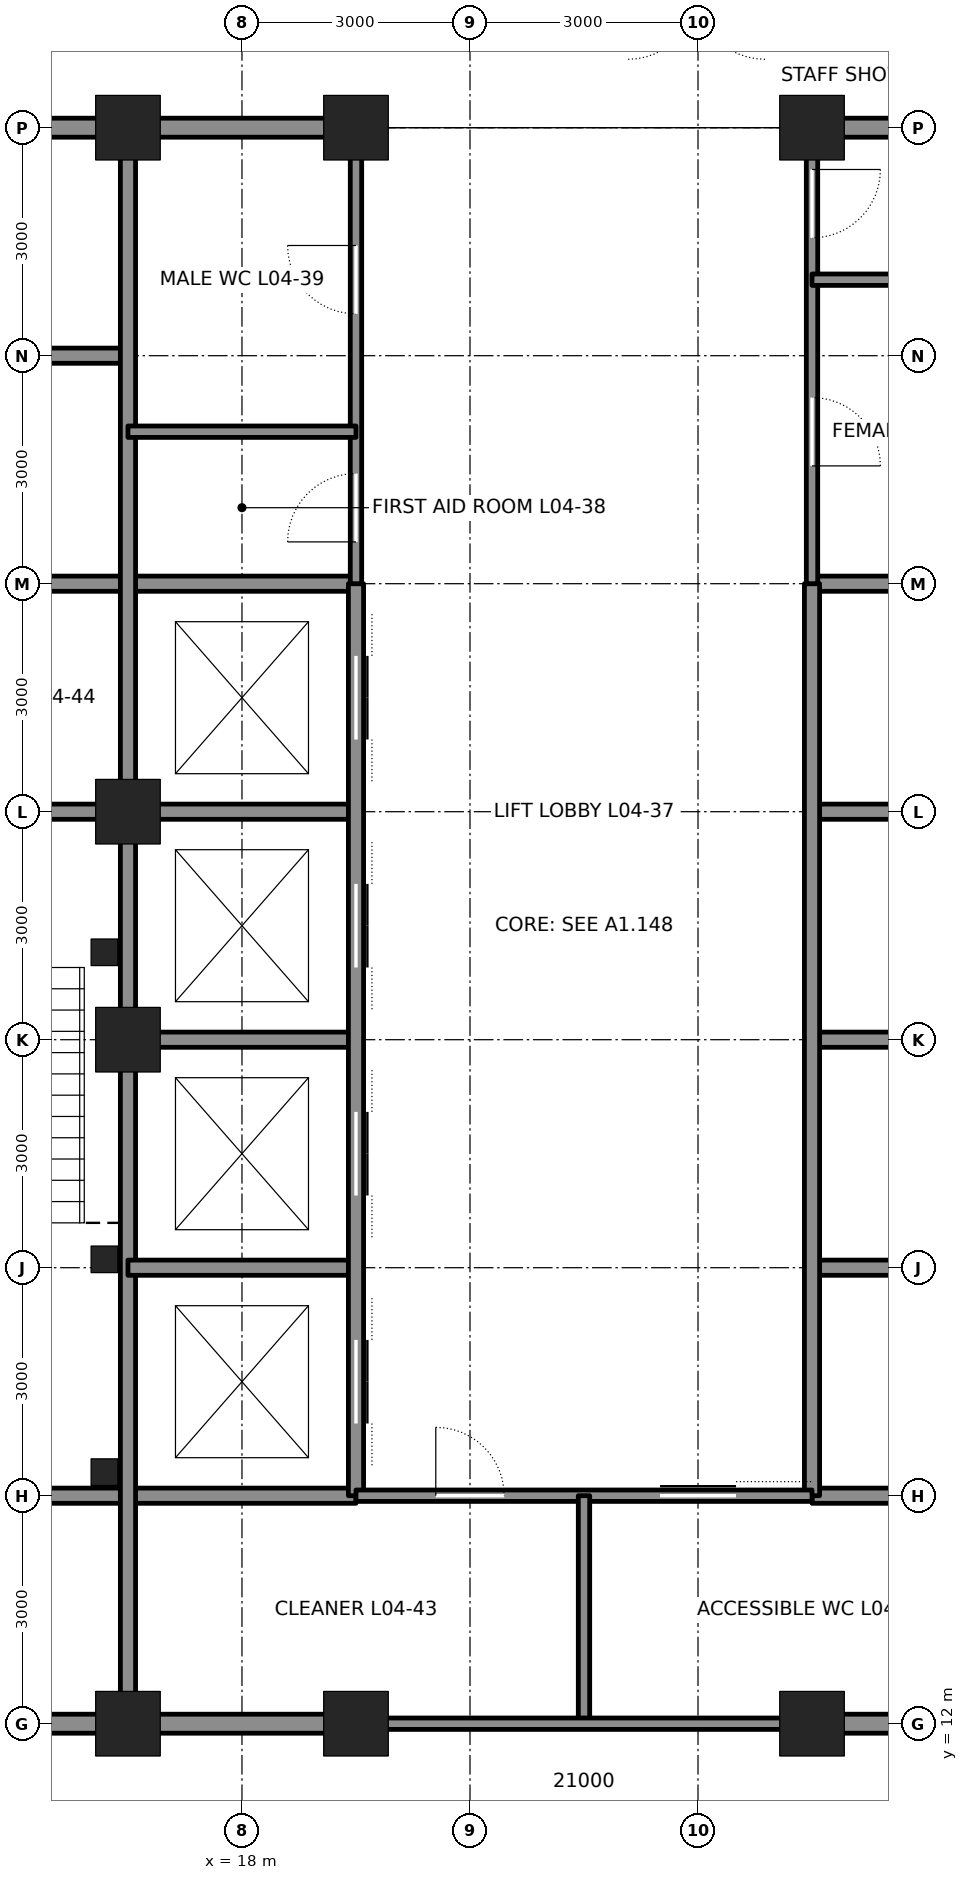
"""IFC4 building model, lengths in metres.
Left out: names, types, materials, properties, quantities, classifications, styles, units other than length and angle.
Written with IfcOpenShell. Run it as: python <this file> out.ifc"""

import sys

from ifc_helpers import new_model, si_unit, direction, frame, frame_2d, origin, origin_2d, place, context, subcontext, project, spatial, rectangle, hollow_rectangle, extrude, element, fill, save


model = new_model("IFC4")
c1 = context("Model", 3, precision=1e-05, world=origin(), true_north=direction((0.0, 1.0)))
c2 = subcontext(c1, "Body", "Model", "MODEL_VIEW")
j1 = project(units=[si_unit("LENGTHUNIT", "METRE"), si_unit("PLANEANGLEUNIT", "RADIAN")], contexts=[c1])
p1 = place(None, origin())
s1 = spatial("IfcSite", under=j1, at=p1, CompositionType="ELEMENT")
p2 = place(p1, origin())
s2 = spatial("IfcBuilding", under=s1, at=p2, CompositionType="ELEMENT")
p3 = place(p2, frame((0.0, 0.0, 24.3)))
s3 = spatial("IfcBuildingStorey", under=s2, at=p3, CompositionType="ELEMENT", Elevation=24.3)
for number, where, z_axis, x_axis in (
    (1, (16.5, 12.0, 0.0), (0.0, 0.0, 1.0), (1.0, 0.0, 0.0)),
    (2, (19.5, 12.0, 0.0), (0.0, 0.0, 1.0), (1.0, 0.0, 0.0)),
    (3, (25.5, 12.0, 0.0), (0.0, 0.0, 1.0), (1.0, 0.0, 0.0)),
    (4, (16.5, 33.0, 0.0), (0.0, 0.0, 1.0), (1.0, 0.0, 0.0)),
    (5, (19.5, 33.0, 0.0), (0.0, 0.0, 1.0), (1.0, 0.0, 0.0)),
    (6, (25.5, 33.0, 0.0), (0.0, 0.0, 1.0), (1.0, 0.0, 0.0)),
    (7, (16.5, 21.0, 0.0), (0.0, 0.0, 1.0), (1.0, 0.0, 0.0)),
    (8, (16.5, 24.0, 0.0), (0.0, 0.0, 1.0), (1.0, 0.0, 0.0)),
):
    element("IfcColumn", number, at=place(p3, frame(where, z_axis=z_axis, x_axis=x_axis)), inside=s3, PredefinedType="COLUMN", context=c2, shape_type="SweptSolid", body=[
        extrude(hollow_rectangle(XDim=0.85, YDim=0.85, WallThickness=0.085, at=origin_2d()), origin(), (0.0, 0.0, 1.0), 4.5),
    ])
p4 = place(p3, frame((12.25, 12.0, 0.0), z_axis=(0.0, 0.0, 1.0), x_axis=(1.0, 0.0, 0.0)))
e9 = element("IfcWall", 9, at=p4, inside=s3, PredefinedType="SOLIDWALL", context=c2, shape_type="SweptSolid", body=[
    extrude(rectangle(XDim=4.0, YDim=0.25, at=frame_2d((2.0, 0.0))), origin(), (0.0, 0.0, 1.0), 3.181),
])
for number, where, z_axis, x_axis in (
    (10, (16.75, 12.0, 0.0), (0.0, 0.0, 1.0), (1.0, 0.0, 0.0)),
    (11, (25.75, 12.0, 0.0), (0.0, 0.0, 1.0), (1.0, 0.0, 0.0)),
):
    element("IfcWall", number, at=place(p3, frame(where, z_axis=z_axis, x_axis=x_axis)), inside=s3, PredefinedType="SOLIDWALL", context=c2, shape_type="SweptSolid", body=[
        extrude(rectangle(XDim=2.5, YDim=0.25, at=frame_2d((1.25, 0.0))), origin(), (0.0, 0.0, 1.0), 3.181),
    ])
for number, where, z_axis, x_axis in (
    (12, (12.0, 15.0, 0.0), (0.0, 0.0, 1.0), (1.0, 0.0, 0.0)),
    (13, (25.5, 15.0, 0.0), (0.0, 0.0, 1.0), (1.0, 0.0, 0.0)),
):
    element("IfcWall", number, at=place(p3, frame(where, z_axis=z_axis, x_axis=x_axis)), inside=s3, PredefinedType="SOLIDWALL", context=c2, shape_type="SweptSolid", body=[
        extrude(rectangle(XDim=7.5, YDim=0.2, at=frame_2d((3.75, 0.0))), origin(), (0.0, 0.0, 1.0), 4.34),
    ])
p5 = place(p3, frame((12.25, 24.0, 0.0), z_axis=(0.0, 0.0, 1.0), x_axis=(1.0, 0.0, 0.0)))
e14 = element("IfcWall", 14, at=p5, inside=s3, PredefinedType="SOLIDWALL", context=c2, shape_type="SweptSolid", body=[
    extrude(rectangle(XDim=4.0, YDim=0.2, at=frame_2d((2.0, 0.0))), origin(), (0.0, 0.0, 1.0), 3.39),
])
p6 = place(p5, frame((1.4, 0.0, 0.0)))
e15 = element("IfcOpeningElement", 15, at=p6, cuts=e14, PredefinedType="OPENING", context=c2, shape_type="SweptSolid", body=[
    extrude(rectangle(XDim=1.2, YDim=2.1, at=frame_2d((0.6, 1.05))), frame((0.0, 0.11, 0.0), z_axis=(0.0, -1.0, 0.0), x_axis=(1.0, 0.0, 0.0)), (0.0, 0.0, 1.0), 0.22),
])
for number, where, z_axis, x_axis in (
    (16, (16.75, 24.0, 0.0), (0.0, 0.0, 1.0), (1.0, 0.0, 0.0)),
    (17, (25.5, 24.0, 0.0), (0.0, 0.0, 1.0), (1.0, 0.0, 0.0)),
):
    element("IfcWall", number, at=place(p3, frame(where, z_axis=z_axis, x_axis=x_axis)), inside=s3, PredefinedType="SOLIDWALL", context=c2, shape_type="SweptSolid", body=[
        extrude(rectangle(XDim=2.75, YDim=0.2, at=frame_2d((1.375, 0.0))), origin(), (0.0, 0.0, 1.0), 3.39),
    ])
p7 = place(p3, frame((12.0, 27.0, 0.0), z_axis=(0.0, 0.0, 1.0), x_axis=(1.0, 0.0, 0.0)))
e18 = element("IfcWall", 18, at=p7, inside=s3, PredefinedType="SOLIDWALL", context=c2, shape_type="SweptSolid", body=[
    extrude(rectangle(XDim=7.5, YDim=0.2, at=frame_2d((3.75, 0.0))), origin(), (0.0, 0.0, 1.0), 4.34),
])
p8 = place(p7, frame((1.65, 0.0, 0.0)))
e19 = element("IfcOpeningElement", 19, at=p8, cuts=e18, PredefinedType="OPENING", context=c2, shape_type="SweptSolid", body=[
    extrude(rectangle(XDim=1.2, YDim=2.1, at=frame_2d((0.6, 1.05))), frame((0.0, 0.11, 0.0), z_axis=(0.0, -1.0, 0.0), x_axis=(1.0, 0.0, 0.0)), (0.0, 0.0, 1.0), 0.22),
])
p9 = place(p3, frame((25.5, 27.0, 0.0), z_axis=(0.0, 0.0, 1.0), x_axis=(1.0, 0.0, 0.0)))
e20 = element("IfcWall", 20, at=p9, inside=s3, PredefinedType="SOLIDWALL", context=c2, shape_type="SweptSolid", body=[
    extrude(rectangle(XDim=3.0, YDim=0.2, at=frame_2d((1.5, 0.0))), origin(), (0.0, 0.0, 1.0), 4.34),
])
p10 = place(p3, frame((12.0, 30.0, 0.0), z_axis=(0.0, 0.0, 1.0), x_axis=(1.0, 0.0, 0.0)))
e21 = element("IfcWall", 21, at=p10, inside=s3, PredefinedType="SOLIDWALL", context=c2, shape_type="SweptSolid", body=[
    extrude(rectangle(XDim=4.5, YDim=0.2, at=frame_2d((2.25, 0.0))), origin(), (0.0, 0.0, 1.0), 4.34),
])
p11 = place(p3, frame((12.25, 33.0, 0.0), z_axis=(0.0, 0.0, 1.0), x_axis=(1.0, 0.0, 0.0)))
e22 = element("IfcWall", 22, at=p11, inside=s3, PredefinedType="SOLIDWALL", context=c2, shape_type="SweptSolid", body=[
    extrude(rectangle(XDim=4.0, YDim=0.25, at=frame_2d((2.0, 0.0))), origin(), (0.0, 0.0, 1.0), 3.181),
])
for number, where, z_axis, x_axis in (
    (23, (16.75, 33.0, 0.0), (0.0, 0.0, 1.0), (1.0, 0.0, 0.0)),
    (24, (25.75, 33.0, 0.0), (0.0, 0.0, 1.0), (1.0, 0.0, 0.0)),
):
    element("IfcWall", number, at=place(p3, frame(where, z_axis=z_axis, x_axis=x_axis)), inside=s3, PredefinedType="SOLIDWALL", context=c2, shape_type="SweptSolid", body=[
        extrude(rectangle(XDim=2.5, YDim=0.25, at=frame_2d((1.25, 0.0))), origin(), (0.0, 0.0, 1.0), 3.181),
    ])
p12 = place(p3, frame((16.5, 12.25, 0.0), z_axis=(0.0, 0.0, 1.0), x_axis=(0.0, 1.0, 0.0)))
e25 = element("IfcWall", 25, at=p12, inside=s3, PredefinedType="SOLIDWALL", context=c2, shape_type="SweptSolid", body=[
    extrude(rectangle(XDim=8.5, YDim=0.2, at=frame_2d((4.25, 0.0))), origin(), (0.0, 0.0, 1.0), 3.413),
])
p13 = place(p3, frame((16.5, 21.25, 0.0), z_axis=(0.0, 0.0, 1.0), x_axis=(0.0, 1.0, 0.0)))
e26 = element("IfcWall", 26, at=p13, inside=s3, PredefinedType="SOLIDWALL", context=c2, shape_type="SweptSolid", body=[
    extrude(rectangle(XDim=2.5, YDim=0.2, at=frame_2d((1.25, 0.0))), origin(), (0.0, 0.0, 1.0), 3.413),
])
p14 = place(p3, frame((16.5, 24.25, 0.0), z_axis=(0.0, 0.0, 1.0), x_axis=(0.0, 1.0, 0.0)))
e27 = element("IfcWall", 27, at=p14, inside=s3, PredefinedType="SOLIDWALL", context=c2, shape_type="SweptSolid", body=[
    extrude(rectangle(XDim=8.5, YDim=0.2, at=frame_2d((4.25, 0.0))), origin(), (0.0, 0.0, 1.0), 3.413),
])
p15 = place(p3, frame((16.5, 18.0, 0.0), z_axis=(0.0, 0.0, 1.0), x_axis=(1.0, 0.0, 0.0)))
e28 = element("IfcWall", 28, at=p15, inside=s3, PredefinedType="SOLIDWALL", context=c2, shape_type="SweptSolid", body=[
    extrude(rectangle(XDim=3.0, YDim=0.2, at=frame_2d((1.5, 0.0))), origin(), (0.0, 0.0, 1.0), 4.34),
])
p16 = place(p3, frame((25.5, 18.0, 0.0), z_axis=(0.0, 0.0, 1.0), x_axis=(1.0, 0.0, 0.0)))
e29 = element("IfcWall", 29, at=p16, inside=s3, PredefinedType="SOLIDWALL", context=c2, shape_type="SweptSolid", body=[
    extrude(rectangle(XDim=7.5, YDim=0.2, at=frame_2d((3.75, 0.0))), origin(), (0.0, 0.0, 1.0), 4.34),
])
p17 = place(p16, frame((4.65, 0.0, 0.0)))
e30 = element("IfcOpeningElement", 30, at=p17, cuts=e29, PredefinedType="OPENING", context=c2, shape_type="SweptSolid", body=[
    extrude(rectangle(XDim=1.2, YDim=2.1, at=frame_2d((0.6, 1.05))), frame((0.0, 0.11, 0.0), z_axis=(0.0, -1.0, 0.0), x_axis=(1.0, 0.0, 0.0)), (0.0, 0.0, 1.0), 0.22),
])
for number, where, z_axis, x_axis in (
    (31, (16.75, 21.0, 0.0), (0.0, 0.0, 1.0), (1.0, 0.0, 0.0)),
    (32, (25.5, 21.0, 0.0), (0.0, 0.0, 1.0), (1.0, 0.0, 0.0)),
):
    element("IfcWall", number, at=place(p3, frame(where, z_axis=z_axis, x_axis=x_axis)), inside=s3, PredefinedType="SOLIDWALL", context=c2, shape_type="SweptSolid", body=[
        extrude(rectangle(XDim=2.75, YDim=0.2, at=frame_2d((1.375, 0.0))), origin(), (0.0, 0.0, 1.0), 3.39),
    ])
p18 = place(p3, frame((19.5, 15.0, 0.0), z_axis=(0.0, 0.0, 1.0), x_axis=(0.0, 1.0, 0.0)))
e33 = element("IfcWall", 33, at=p18, inside=s3, PredefinedType="SOLIDWALL", context=c2, shape_type="SweptSolid", body=[
    extrude(rectangle(XDim=12.0, YDim=0.2, at=frame_2d((6.0, 0.0))), origin(), (0.0, 0.0, 1.0), 3.365),
])
p19 = place(p18, frame((0.95, 0.0, 0.0)))
e34 = element("IfcOpeningElement", 34, at=p19, cuts=e33, PredefinedType="OPENING", context=c2, shape_type="SweptSolid", body=[
    extrude(rectangle(XDim=1.1, YDim=2.1, at=frame_2d((0.55, 1.05))), frame((0.0, 0.11, 0.0), z_axis=(0.0, -1.0, 0.0), x_axis=(1.0, 0.0, 0.0)), (0.0, 0.0, 1.0), 0.22),
])
p20 = place(p18, frame((3.95, 0.0, 0.0)))
e35 = element("IfcOpeningElement", 35, at=p20, cuts=e33, PredefinedType="OPENING", context=c2, shape_type="SweptSolid", body=[
    extrude(rectangle(XDim=1.1, YDim=2.1, at=frame_2d((0.55, 1.05))), frame((0.0, 0.11, 0.0), z_axis=(0.0, -1.0, 0.0), x_axis=(1.0, 0.0, 0.0)), (0.0, 0.0, 1.0), 0.22),
])
p21 = place(p18, frame((6.95, 0.0, 0.0)))
e36 = element("IfcOpeningElement", 36, at=p21, cuts=e33, PredefinedType="OPENING", context=c2, shape_type="SweptSolid", body=[
    extrude(rectangle(XDim=1.1, YDim=2.1, at=frame_2d((0.55, 1.05))), frame((0.0, 0.11, 0.0), z_axis=(0.0, -1.0, 0.0), x_axis=(1.0, 0.0, 0.0)), (0.0, 0.0, 1.0), 0.22),
])
p22 = place(p18, frame((9.95, 0.0, 0.0)))
e37 = element("IfcOpeningElement", 37, at=p22, cuts=e33, PredefinedType="OPENING", context=c2, shape_type="SweptSolid", body=[
    extrude(rectangle(XDim=1.1, YDim=2.1, at=frame_2d((0.55, 1.05))), frame((0.0, 0.11, 0.0), z_axis=(0.0, -1.0, 0.0), x_axis=(1.0, 0.0, 0.0)), (0.0, 0.0, 1.0), 0.22),
])
p23 = place(p3, frame((19.5, 27.0, 0.0), z_axis=(0.0, 0.0, 1.0), x_axis=(0.0, 1.0, 0.0)))
e38 = element("IfcWall", 38, at=p23, inside=s3, PredefinedType="PARTITIONING", context=c2, shape_type="SweptSolid", body=[
    extrude(rectangle(XDim=5.75, YDim=0.15, at=frame_2d((2.875, 0.0))), origin(), (0.0, 0.0, 1.0), 3.365),
])
p24 = place(p23, frame((0.55, 0.0, 0.0)))
e39 = element("IfcOpeningElement", 39, at=p24, cuts=e38, PredefinedType="OPENING", context=c2, shape_type="SweptSolid", body=[
    extrude(rectangle(XDim=0.9, YDim=2.1, at=frame_2d((0.45, 1.05))), frame((0.0, 0.085, 0.0), z_axis=(0.0, -1.0, 0.0), x_axis=(1.0, 0.0, 0.0)), (0.0, 0.0, 1.0), 0.17),
])
p25 = place(p23, frame((3.55, 0.0, 0.0)))
e40 = element("IfcOpeningElement", 40, at=p25, cuts=e38, PredefinedType="OPENING", context=c2, shape_type="SweptSolid", body=[
    extrude(rectangle(XDim=0.9, YDim=2.1, at=frame_2d((0.45, 1.05))), frame((0.0, 0.085, 0.0), z_axis=(0.0, -1.0, 0.0), x_axis=(1.0, 0.0, 0.0)), (0.0, 0.0, 1.0), 0.17),
])
p26 = place(p3, frame((25.5, 15.0, 0.0), z_axis=(0.0, 0.0, 1.0), x_axis=(0.0, 1.0, 0.0)))
e41 = element("IfcWall", 41, at=p26, inside=s3, PredefinedType="SOLIDWALL", context=c2, shape_type="SweptSolid", body=[
    extrude(rectangle(XDim=12.0, YDim=0.2, at=frame_2d((6.0, 0.0))), origin(), (0.0, 0.0, 1.0), 3.365),
])
p27 = place(p3, frame((25.5, 27.0, 0.0), z_axis=(0.0, 0.0, 1.0), x_axis=(0.0, 1.0, 0.0)))
e42 = element("IfcWall", 42, at=p27, inside=s3, PredefinedType="PARTITIONING", context=c2, shape_type="SweptSolid", body=[
    extrude(rectangle(XDim=5.75, YDim=0.15, at=frame_2d((2.875, 0.0))), origin(), (0.0, 0.0, 1.0), 3.365),
])
p28 = place(p27, frame((1.55, 0.0, 0.0)))
e43 = element("IfcOpeningElement", 43, at=p28, cuts=e42, PredefinedType="OPENING", context=c2, shape_type="SweptSolid", body=[
    extrude(rectangle(XDim=0.9, YDim=2.1, at=frame_2d((0.45, 1.05))), frame((0.0, 0.085, 0.0), z_axis=(0.0, -1.0, 0.0), x_axis=(1.0, 0.0, 0.0)), (0.0, 0.0, 1.0), 0.17),
])
p29 = place(p27, frame((4.55, 0.0, 0.0)))
e44 = element("IfcOpeningElement", 44, at=p29, cuts=e42, PredefinedType="OPENING", context=c2, shape_type="SweptSolid", body=[
    extrude(rectangle(XDim=0.9, YDim=2.1, at=frame_2d((0.45, 1.05))), frame((0.0, 0.085, 0.0), z_axis=(0.0, -1.0, 0.0), x_axis=(1.0, 0.0, 0.0)), (0.0, 0.0, 1.0), 0.17),
])
p30 = place(p3, frame((19.5, 15.0, 0.0), z_axis=(0.0, 0.0, 1.0), x_axis=(1.0, 0.0, 0.0)))
e45 = element("IfcWall", 45, at=p30, inside=s3, PredefinedType="PARTITIONING", context=c2, shape_type="SweptSolid", body=[
    extrude(rectangle(XDim=6.0, YDim=0.15, at=frame_2d((3.0, 0.0))), origin(), (0.0, 0.0, 1.0), 4.34),
])
p31 = place(p30, frame((4.0, 0.0, 0.0)))
e46 = element("IfcOpeningElement", 46, at=p31, cuts=e45, PredefinedType="OPENING", context=c2, shape_type="SweptSolid", body=[
    extrude(rectangle(XDim=1.0, YDim=2.1, at=frame_2d((0.5, 1.05))), frame((0.0, 0.085, 0.0), z_axis=(0.0, -1.0, 0.0), x_axis=(1.0, 0.0, 0.0)), (0.0, 0.0, 1.0), 0.17),
])
p32 = place(p30, frame((1.05, 0.0, 0.0)))
e47 = element("IfcOpeningElement", 47, at=p32, cuts=e45, PredefinedType="OPENING", context=c2, shape_type="SweptSolid", body=[
    extrude(rectangle(XDim=0.9, YDim=2.1, at=frame_2d((0.45, 1.05))), frame((0.0, 0.085, 0.0), z_axis=(0.0, -1.0, 0.0), x_axis=(1.0, 0.0, 0.0)), (0.0, 0.0, 1.0), 0.17),
])
p33 = place(p3, frame((22.5, 15.0, 0.0), z_axis=(0.0, 0.0, 1.0), x_axis=(0.0, -1.0, 0.0)))
e48 = element("IfcWall", 48, at=p33, inside=s3, PredefinedType="PARTITIONING", context=c2, shape_type="SweptSolid", body=[
    extrude(rectangle(XDim=3.0, YDim=0.15, at=frame_2d((1.5, 0.0))), origin(), (0.0, 0.0, 1.0), 4.34),
])
p34 = place(p3, frame((19.5, 12.0, 0.0), z_axis=(0.0, 0.0, 1.0), x_axis=(1.0, 0.0, 0.0)))
e49 = element("IfcWall", 49, at=p34, inside=s3, PredefinedType="PARTITIONING", context=c2, shape_type="SweptSolid", body=[
    extrude(rectangle(XDim=6.0, YDim=0.15, at=frame_2d((3.0, 0.0))), origin(), (0.0, 0.0, 1.0), 3.181),
])
for number, where, z_axis, x_axis in (
    (50, (16.5, 29.0, 0.0), (0.0, 0.0, 1.0), (1.0, 0.0, 0.0)),
    (51, (25.5, 31.0, 0.0), (0.0, 0.0, 1.0), (1.0, 0.0, 0.0)),
):
    element("IfcWall", number, at=place(p3, frame(where, z_axis=z_axis, x_axis=x_axis)), inside=s3, PredefinedType="PARTITIONING", context=c2, shape_type="SweptSolid", body=[
        extrude(rectangle(XDim=3.0, YDim=0.15, at=frame_2d((1.5, 0.0))), origin(), (0.0, 0.0, 1.0), 4.34),
    ])
for number, where, z_axis, x_axis in (
    (52, (16.19, 15.31, 0.0), (0.0, 0.0, 1.0), (1.0, 0.0, 0.0)),
    (53, (16.19, 18.11, 0.0), (0.0, 0.0, 1.0), (1.0, 0.0, 0.0)),
    (54, (16.19, 22.15, 0.0), (0.0, 0.0, 1.0), (1.0, 0.0, 0.0)),
):
    element("IfcColumn", number, at=place(p3, frame(where, z_axis=z_axis, x_axis=x_axis)), inside=s3, PredefinedType="COLUMN", context=c2, shape_type="SweptSolid", body=[
        extrude(hollow_rectangle(XDim=0.35, YDim=0.35, WallThickness=0.035, at=origin_2d()), origin(), (0.0, 0.0, 1.0), 4.5),
    ])
p35 = place(p24, origin())
e55 = element("IfcDoor", 55, at=p35, inside=s3, OperationType="SINGLE_SWING_LEFT", PredefinedType="DOOR", context=c2, shape_type="SweptSolid", body=[
    extrude(rectangle(XDim=0.9, YDim=2.1, at=frame_2d((0.45, 1.05))), frame((0.0, 0.025, 0.0), z_axis=(0.0, -1.0, 0.0), x_axis=(1.0, 0.0, 0.0)), (0.0, 0.0, 1.0), 0.05),
])
fill(e39, e55)
p36 = place(p25, origin())
e56 = element("IfcDoor", 56, at=p36, inside=s3, OperationType="SINGLE_SWING_RIGHT", PredefinedType="DOOR", context=c2, shape_type="SweptSolid", body=[
    extrude(rectangle(XDim=0.9, YDim=2.1, at=frame_2d((0.45, 1.05))), frame((0.0, 0.025, 0.0), z_axis=(0.0, -1.0, 0.0), x_axis=(1.0, 0.0, 0.0)), (0.0, 0.0, 1.0), 0.05),
])
fill(e40, e56)
p37 = place(p28, frame((0.9, 0.0, 0.0), z_axis=(0.0, 0.0, 1.0), x_axis=(-1.0, 0.0, 0.0)))
e57 = element("IfcDoor", 57, at=p37, inside=s3, OperationType="SINGLE_SWING_RIGHT", PredefinedType="DOOR", context=c2, shape_type="SweptSolid", body=[
    extrude(rectangle(XDim=0.9, YDim=2.1, at=frame_2d((0.45, 1.05))), frame((0.0, 0.025, 0.0), z_axis=(0.0, -1.0, 0.0), x_axis=(1.0, 0.0, 0.0)), (0.0, 0.0, 1.0), 0.05),
])
fill(e43, e57)
p38 = place(p29, frame((0.9, 0.0, 0.0), z_axis=(0.0, 0.0, 1.0), x_axis=(-1.0, 0.0, 0.0)))
e58 = element("IfcDoor", 58, at=p38, inside=s3, OperationType="SINGLE_SWING_LEFT", PredefinedType="DOOR", context=c2, shape_type="SweptSolid", body=[
    extrude(rectangle(XDim=0.9, YDim=2.1, at=frame_2d((0.45, 1.05))), frame((0.0, 0.025, 0.0), z_axis=(0.0, -1.0, 0.0), x_axis=(1.0, 0.0, 0.0)), (0.0, 0.0, 1.0), 0.05),
])
fill(e44, e58)
p39 = place(p31, origin())
e59 = element("IfcDoor", 59, at=p39, inside=s3, OperationType="SLIDING_TO_LEFT", PredefinedType="DOOR", context=c2, shape_type="SweptSolid", body=[
    extrude(rectangle(XDim=1.0, YDim=2.1, at=frame_2d((0.5, 1.05))), frame((0.0, 0.025, 0.0), z_axis=(0.0, -1.0, 0.0), x_axis=(1.0, 0.0, 0.0)), (0.0, 0.0, 1.0), 0.05),
])
fill(e46, e59)
p40 = place(p32, origin())
e60 = element("IfcDoor", 60, at=p40, inside=s3, OperationType="SINGLE_SWING_LEFT", PredefinedType="DOOR", context=c2, shape_type="SweptSolid", body=[
    extrude(rectangle(XDim=0.9, YDim=2.1, at=frame_2d((0.45, 1.05))), frame((0.0, 0.025, 0.0), z_axis=(0.0, -1.0, 0.0), x_axis=(1.0, 0.0, 0.0)), (0.0, 0.0, 1.0), 0.05),
])
fill(e47, e60)
p41 = place(p19, origin())
e61 = element("IfcDoor", 61, at=p41, inside=s3, OperationType="DOUBLE_DOOR_SLIDING", PredefinedType="DOOR", context=c2, shape_type="SweptSolid", body=[
    extrude(rectangle(XDim=1.1, YDim=2.1, at=frame_2d((0.55, 1.05))), frame((0.0, 0.025, 0.0), z_axis=(0.0, -1.0, 0.0), x_axis=(1.0, 0.0, 0.0)), (0.0, 0.0, 1.0), 0.05),
])
fill(e34, e61)
p42 = place(p20, origin())
e62 = element("IfcDoor", 62, at=p42, inside=s3, OperationType="DOUBLE_DOOR_SLIDING", PredefinedType="DOOR", context=c2, shape_type="SweptSolid", body=[
    extrude(rectangle(XDim=1.1, YDim=2.1, at=frame_2d((0.55, 1.05))), frame((0.0, 0.025, 0.0), z_axis=(0.0, -1.0, 0.0), x_axis=(1.0, 0.0, 0.0)), (0.0, 0.0, 1.0), 0.05),
])
fill(e35, e62)
p43 = place(p21, origin())
e63 = element("IfcDoor", 63, at=p43, inside=s3, OperationType="DOUBLE_DOOR_SLIDING", PredefinedType="DOOR", context=c2, shape_type="SweptSolid", body=[
    extrude(rectangle(XDim=1.1, YDim=2.1, at=frame_2d((0.55, 1.05))), frame((0.0, 0.025, 0.0), z_axis=(0.0, -1.0, 0.0), x_axis=(1.0, 0.0, 0.0)), (0.0, 0.0, 1.0), 0.05),
])
fill(e36, e63)
p44 = place(p22, origin())
e64 = element("IfcDoor", 64, at=p44, inside=s3, OperationType="DOUBLE_DOOR_SLIDING", PredefinedType="DOOR", context=c2, shape_type="SweptSolid", body=[
    extrude(rectangle(XDim=1.1, YDim=2.1, at=frame_2d((0.55, 1.05))), frame((0.0, 0.025, 0.0), z_axis=(0.0, -1.0, 0.0), x_axis=(1.0, 0.0, 0.0)), (0.0, 0.0, 1.0), 0.05),
])
fill(e37, e64)
save(model, sys.argv[1])
